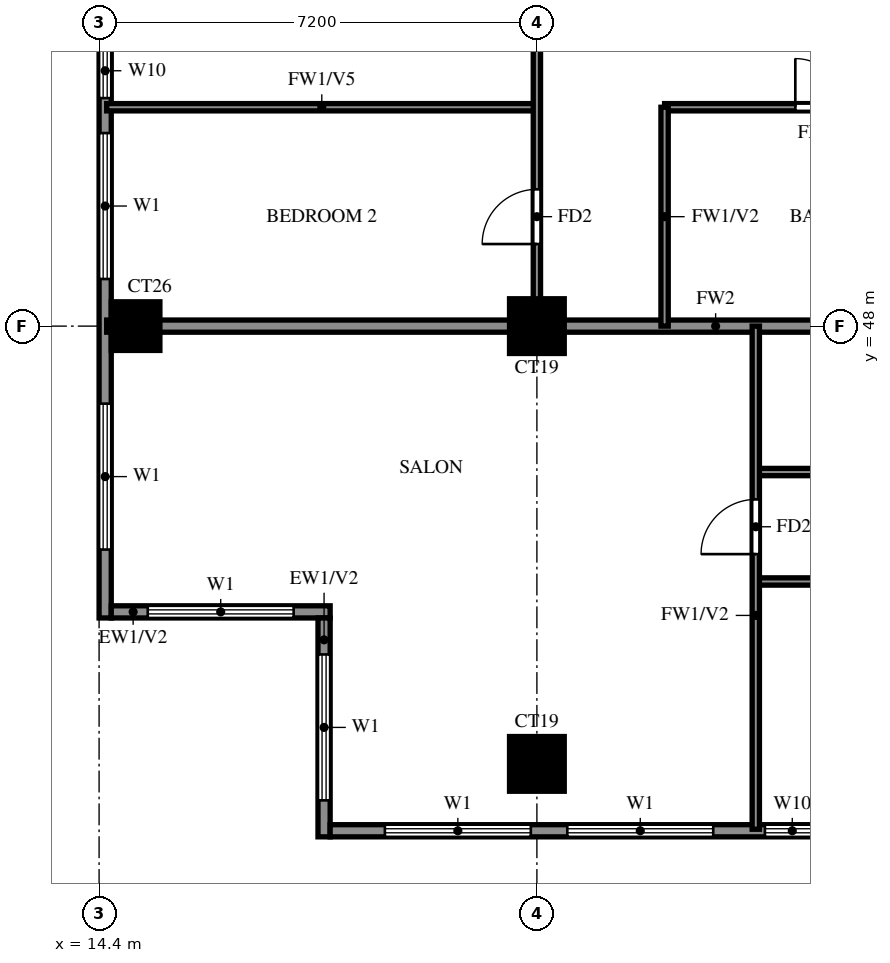
"""IFC4 building model, lengths in metres.
Left out: names, types, materials, properties, quantities, classifications, styles, units other than length and angle.
Written with IfcOpenShell. Run it as: python <this file> out.ifc"""

import sys

from ifc_helpers import new_model, si_unit, direction, frame, frame_2d, origin, origin_2d, place, context, subcontext, project, spatial, rectangle, extrude, source, transform, mapped, element, fill, save


model = new_model("IFC4")
c1 = context("Model", 3, precision=1e-05, world=origin(), true_north=direction((0.0, 1.0)))
c2 = subcontext(c1, "Body", "Model", "MODEL_VIEW")
j1 = project(units=[si_unit("LENGTHUNIT", "METRE"), si_unit("PLANEANGLEUNIT", "RADIAN")], contexts=[c1])
p1 = place(None, origin())
s1 = spatial("IfcSite", under=j1, at=p1, CompositionType="ELEMENT")
p2 = place(p1, origin())
s2 = spatial("IfcBuilding", under=s1, at=p2, CompositionType="ELEMENT")
p3 = place(p2, frame((0.0, 0.0, 181.5)))
s3 = spatial("IfcBuildingStorey", under=s2, at=p3, CompositionType="ELEMENT", Elevation=181.5)
m1 = source(origin(), c2, "Body", "SweptSolid", [
    extrude(rectangle(XDim=0.9, YDim=0.9, at=origin_2d()), origin(), (0.0, 0.0, 1.0), 3.2),
])
p4 = place(p3, frame((21.6, 40.8, 0.0), z_axis=(0.0, 0.0, 1.0), x_axis=(1.0, 0.0, 0.0)))
e1 = element("IfcColumn", 1, at=p4, inside=s3, PredefinedType="COLUMN", context=c2, shape_type="MappedRepresentation", body=[
    mapped(m1, transform((0.0, 0.0, 0.0))),
])
m2 = source(origin(), c2, "Body", "SweptSolid", [
    extrude(rectangle(XDim=0.8, YDim=0.8, at=origin_2d()), origin(), (0.0, 0.0, 1.0), 3.2),
])
p5 = place(p3, frame((15.0, 48.0, 0.0), z_axis=(0.0, 0.0, 1.0), x_axis=(1.0, 0.0, 0.0)))
e2 = element("IfcColumn", 2, at=p5, inside=s3, PredefinedType="COLUMN", context=c2, shape_type="MappedRepresentation", body=[
    mapped(m2, transform((0.0, 0.0, 0.0))),
])
p6 = place(p3, frame((21.6, 48.0, 0.0), z_axis=(0.0, 0.0, 1.0), x_axis=(1.0, 0.0, 0.0)))
e3 = element("IfcColumn", 3, at=p6, inside=s3, PredefinedType="COLUMN", context=c2, shape_type="MappedRepresentation", body=[
    mapped(m1, transform((0.0, 0.0, 0.0))),
])
p7 = place(p3, frame((14.5, 76.6, 0.0), z_axis=(0.0, 0.0, 1.0), x_axis=(0.0, -1.0, 0.0)))
e4 = element("IfcWall", 4, at=p7, inside=s3, PredefinedType="SOLIDWALL", context=c2, shape_type="SweptSolid", body=[
    extrude(rectangle(XDim=33.4, YDim=0.2, at=frame_2d((16.7, 0.0))), origin(), (0.0, 0.0, 1.0), 3.2),
])
p8 = place(p7, frame((18.7, 0.0, 0.0)))
e5 = element("IfcOpeningElement", 5, at=p8, cuts=e4, PredefinedType="OPENING", context=c2, shape_type="SweptSolid", body=[
    extrude(rectangle(XDim=1.8, YDim=2.4, at=frame_2d((0.9, 1.2))), frame((0.0, 0.11, 0.0), z_axis=(0.0, -1.0, 0.0), x_axis=(1.0, 0.0, 0.0)), (0.0, 0.0, 1.0), 0.22),
])
p9 = place(p7, frame((29.875, 0.0, 0.6)))
e6 = element("IfcOpeningElement", 6, at=p9, cuts=e4, PredefinedType="OPENING", context=c2, shape_type="SweptSolid", body=[
    extrude(rectangle(XDim=2.4, YDim=2.4, at=frame_2d((1.2, 1.2))), frame((0.0, 0.11, 0.0), z_axis=(0.0, -1.0, 0.0), x_axis=(1.0, 0.0, 0.0)), (0.0, 0.0, 1.0), 0.22),
])
p10 = place(p7, frame((25.425, 0.0, 0.6)))
e7 = element("IfcOpeningElement", 7, at=p10, cuts=e4, PredefinedType="OPENING", context=c2, shape_type="SweptSolid", body=[
    extrude(rectangle(XDim=2.4, YDim=2.4, at=frame_2d((1.2, 1.2))), frame((0.0, 0.11, 0.0), z_axis=(0.0, -1.0, 0.0), x_axis=(1.0, 0.0, 0.0)), (0.0, 0.0, 1.0), 0.22),
])
p11 = place(p7, frame((21.875, 0.0, 0.6)))
e8 = element("IfcOpeningElement", 8, at=p11, cuts=e4, PredefinedType="OPENING", context=c2, shape_type="SweptSolid", body=[
    extrude(rectangle(XDim=1.2, YDim=2.4, at=frame_2d((0.6, 1.2))), frame((0.0, 0.11, 0.0), z_axis=(0.0, -1.0, 0.0), x_axis=(1.0, 0.0, 0.0)), (0.0, 0.0, 1.0), 0.22),
])
p12 = place(p7, frame((23.95, 0.0, 0.6)))
e9 = element("IfcOpeningElement", 9, at=p12, cuts=e4, PredefinedType="OPENING", context=c2, shape_type="SweptSolid", body=[
    extrude(rectangle(XDim=0.9, YDim=2.4, at=frame_2d((0.45, 1.2))), frame((0.0, 0.11, 0.0), z_axis=(0.0, -1.0, 0.0), x_axis=(1.0, 0.0, 0.0)), (0.0, 0.0, 1.0), 0.22),
])
p13 = place(p7, frame((14.675, 0.0, 0.6)))
e10 = element("IfcOpeningElement", 10, at=p13, cuts=e4, PredefinedType="OPENING", context=c2, shape_type="SweptSolid", body=[
    extrude(rectangle(XDim=1.8, YDim=2.4, at=frame_2d((0.9, 1.2))), frame((0.0, 0.11, 0.0), z_axis=(0.0, -1.0, 0.0), x_axis=(1.0, 0.0, 0.0)), (0.0, 0.0, 1.0), 0.22),
])
p14 = place(p7, frame((7.95, 0.0, 0.6)))
e11 = element("IfcOpeningElement", 11, at=p14, cuts=e4, PredefinedType="OPENING", context=c2, shape_type="SweptSolid", body=[
    extrude(rectangle(XDim=2.4, YDim=2.4, at=frame_2d((1.2, 1.2))), frame((0.0, 0.11, 0.0), z_axis=(0.0, -1.0, 0.0), x_axis=(1.0, 0.0, 0.0)), (0.0, 0.0, 1.0), 0.22),
])
p15 = place(p7, frame((10.85, 0.0, 0.6)))
e12 = element("IfcOpeningElement", 12, at=p15, cuts=e4, PredefinedType="OPENING", context=c2, shape_type="SweptSolid", body=[
    extrude(rectangle(XDim=2.4, YDim=2.4, at=frame_2d((1.2, 1.2))), frame((0.0, 0.11, 0.0), z_axis=(0.0, -1.0, 0.0), x_axis=(1.0, 0.0, 0.0)), (0.0, 0.0, 1.0), 0.22),
])
p16 = place(p7, frame((4.575, 0.0, 1.5)))
e13 = element("IfcOpeningElement", 13, at=p16, cuts=e4, PredefinedType="OPENING", context=c2, shape_type="SweptSolid", body=[
    extrude(rectangle(XDim=0.9, YDim=0.9, at=frame_2d((0.45, 0.45))), frame((0.0, 0.11, 0.0), z_axis=(0.0, -1.0, 0.0), x_axis=(1.0, 0.0, 0.0)), (0.0, 0.0, 1.0), 0.22),
])
p17 = place(p7, frame((0.6, 0.0, 0.6)))
e14 = element("IfcOpeningElement", 14, at=p17, cuts=e4, PredefinedType="OPENING", context=c2, shape_type="SweptSolid", body=[
    extrude(rectangle(XDim=2.4, YDim=2.4, at=frame_2d((1.2, 1.2))), frame((0.0, 0.11, 0.0), z_axis=(0.0, -1.0, 0.0), x_axis=(1.0, 0.0, 0.0)), (0.0, 0.0, 1.0), 0.22),
])
p18 = place(p3, frame((14.6, 43.3, 0.0), z_axis=(0.0, 0.0, 1.0), x_axis=(1.0, 0.0, 0.0)))
e15 = element("IfcWall", 15, at=p18, inside=s3, PredefinedType="SOLIDWALL", context=c2, shape_type="SweptSolid", body=[
    extrude(rectangle(XDim=3.6, YDim=0.2, at=frame_2d((1.8, 0.0))), origin(), (0.0, 0.0, 1.0), 3.2),
])
p19 = place(p18, frame((0.6, 0.0, 0.6)))
e16 = element("IfcOpeningElement", 16, at=p19, cuts=e15, PredefinedType="OPENING", context=c2, shape_type="SweptSolid", body=[
    extrude(rectangle(XDim=2.4, YDim=2.4, at=frame_2d((1.2, 1.2))), frame((0.0, 0.11, 0.0), z_axis=(0.0, -1.0, 0.0), x_axis=(1.0, 0.0, 0.0)), (0.0, 0.0, 1.0), 0.22),
])
p20 = place(p3, frame((18.1, 43.2, 0.0), z_axis=(0.0, 0.0, 1.0), x_axis=(0.0, -1.0, 0.0)))
e17 = element("IfcWall", 17, at=p20, inside=s3, PredefinedType="SOLIDWALL", context=c2, shape_type="SweptSolid", body=[
    extrude(rectangle(XDim=3.6, YDim=0.2, at=frame_2d((1.8, 0.0))), origin(), (0.0, 0.0, 1.0), 3.2),
])
p21 = place(p20, frame((0.6, 0.0, 0.6)))
e18 = element("IfcOpeningElement", 18, at=p21, cuts=e17, PredefinedType="OPENING", context=c2, shape_type="SweptSolid", body=[
    extrude(rectangle(XDim=2.4, YDim=2.4, at=frame_2d((1.2, 1.2))), frame((0.0, 0.11, 0.0), z_axis=(0.0, -1.0, 0.0), x_axis=(1.0, 0.0, 0.0)), (0.0, 0.0, 1.0), 0.22),
])
p22 = place(p3, frame((18.2, 39.7, 0.0), z_axis=(0.0, 0.0, 1.0), x_axis=(1.0, 0.0, 0.0)))
e19 = element("IfcWall", 19, at=p22, inside=s3, PredefinedType="SOLIDWALL", context=c2, shape_type="SweptSolid", body=[
    extrude(rectangle(XDim=23.8, YDim=0.2, at=frame_2d((11.9, 0.0))), origin(), (0.0, 0.0, 1.0), 3.2),
])
p23 = place(p22, frame((11.5, 0.0, 0.0)))
e20 = element("IfcOpeningElement", 20, at=p23, cuts=e19, PredefinedType="OPENING", context=c2, shape_type="SweptSolid", body=[
    extrude(rectangle(XDim=1.8, YDim=2.4, at=frame_2d((0.9, 1.2))), frame((0.0, 0.11, 0.0), z_axis=(0.0, -1.0, 0.0), x_axis=(1.0, 0.0, 0.0)), (0.0, 0.0, 1.0), 0.22),
])
p24 = place(p22, frame((0.9, 0.0, 0.6)))
e21 = element("IfcOpeningElement", 21, at=p24, cuts=e19, PredefinedType="OPENING", context=c2, shape_type="SweptSolid", body=[
    extrude(rectangle(XDim=2.4, YDim=2.4, at=frame_2d((1.2, 1.2))), frame((0.0, 0.11, 0.0), z_axis=(0.0, -1.0, 0.0), x_axis=(1.0, 0.0, 0.0)), (0.0, 0.0, 1.0), 0.22),
])
p25 = place(p22, frame((3.9, 0.0, 0.6)))
e22 = element("IfcOpeningElement", 22, at=p25, cuts=e19, PredefinedType="OPENING", context=c2, shape_type="SweptSolid", body=[
    extrude(rectangle(XDim=2.4, YDim=2.4, at=frame_2d((1.2, 1.2))), frame((0.0, 0.11, 0.0), z_axis=(0.0, -1.0, 0.0), x_axis=(1.0, 0.0, 0.0)), (0.0, 0.0, 1.0), 0.22),
])
p26 = place(p22, frame((7.15, 0.0, 0.6)))
e23 = element("IfcOpeningElement", 23, at=p26, cuts=e19, PredefinedType="OPENING", context=c2, shape_type="SweptSolid", body=[
    extrude(rectangle(XDim=0.9, YDim=2.4, at=frame_2d((0.45, 1.2))), frame((0.0, 0.11, 0.0), z_axis=(0.0, -1.0, 0.0), x_axis=(1.0, 0.0, 0.0)), (0.0, 0.0, 1.0), 0.22),
])
p27 = place(p22, frame((9.1, 0.0, 0.6)))
e24 = element("IfcOpeningElement", 24, at=p27, cuts=e19, PredefinedType="OPENING", context=c2, shape_type="SweptSolid", body=[
    extrude(rectangle(XDim=1.2, YDim=2.4, at=frame_2d((0.6, 1.2))), frame((0.0, 0.11, 0.0), z_axis=(0.0, -1.0, 0.0), x_axis=(1.0, 0.0, 0.0)), (0.0, 0.0, 1.0), 0.22),
])
p28 = place(p22, frame((13.75, 0.0, 0.6)))
e25 = element("IfcOpeningElement", 25, at=p28, cuts=e19, PredefinedType="OPENING", context=c2, shape_type="SweptSolid", body=[
    extrude(rectangle(XDim=0.9, YDim=2.4, at=frame_2d((0.45, 1.2))), frame((0.0, 0.11, 0.0), z_axis=(0.0, -1.0, 0.0), x_axis=(1.0, 0.0, 0.0)), (0.0, 0.0, 1.0), 0.22),
])
p29 = place(p3, frame((14.525, 48.0, 0.0), z_axis=(0.0, 0.0, 1.0), x_axis=(1.0, 0.0, 0.0)))
e26 = element("IfcWall", 26, at=p29, inside=s3, PredefinedType="SOLIDWALL", context=c2, shape_type="SweptSolid", body=[
    extrude(rectangle(XDim=19.075, YDim=0.2, at=frame_2d((9.538, 0.0))), origin(), (0.0, 0.0, 1.0), 3.2),
])
p30 = place(p3, frame((25.2, 43.8, 0.0), z_axis=(0.0, 0.0, 1.0), x_axis=(1.0, 0.0, 0.0)))
e27 = element("IfcWall", 27, at=p30, inside=s3, PredefinedType="PARTITIONING", context=c2, shape_type="SweptSolid", body=[
    extrude(rectangle(XDim=8.4, YDim=0.12, at=frame_2d((4.2, 0.0))), origin(), (0.0, 0.0, 1.0), 3.2),
])
p31 = place(p30, frame((1.35, 0.0, 0.0)))
e28 = element("IfcOpeningElement", 28, at=p31, cuts=e27, PredefinedType="OPENING", context=c2, shape_type="SweptSolid", body=[
    extrude(rectangle(XDim=0.9, YDim=2.1, at=frame_2d((0.45, 1.05))), frame((0.0, 0.07, 0.0), z_axis=(0.0, -1.0, 0.0), x_axis=(1.0, 0.0, 0.0)), (0.0, 0.0, 1.0), 0.14),
])
p32 = place(p30, frame((5.55, 0.0, 0.0)))
e29 = element("IfcOpeningElement", 29, at=p32, cuts=e27, PredefinedType="OPENING", context=c2, shape_type="SweptSolid", body=[
    extrude(rectangle(XDim=0.9, YDim=2.1, at=frame_2d((0.45, 1.05))), frame((0.0, 0.07, 0.0), z_axis=(0.0, -1.0, 0.0), x_axis=(1.0, 0.0, 0.0)), (0.0, 0.0, 1.0), 0.14),
])
p33 = place(p3, frame((25.2, 45.6, 0.0), z_axis=(0.0, 0.0, 1.0), x_axis=(1.0, 0.0, 0.0)))
e30 = element("IfcWall", 30, at=p33, inside=s3, PredefinedType="PARTITIONING", context=c2, shape_type="SweptSolid", body=[
    extrude(rectangle(XDim=6.0, YDim=0.12, at=frame_2d((3.0, 0.0))), origin(), (0.0, 0.0, 1.0), 3.2),
])
p34 = place(p33, frame((1.45, 0.0, 0.0)))
e31 = element("IfcOpeningElement", 31, at=p34, cuts=e30, PredefinedType="OPENING", context=c2, shape_type="SweptSolid", body=[
    extrude(rectangle(XDim=0.9, YDim=2.1, at=frame_2d((0.45, 1.05))), frame((0.0, 0.07, 0.0), z_axis=(0.0, -1.0, 0.0), x_axis=(1.0, 0.0, 0.0)), (0.0, 0.0, 1.0), 0.14),
])
p35 = place(p3, frame((14.525, 51.6, 0.0), z_axis=(0.0, 0.0, 1.0), x_axis=(1.0, 0.0, 0.0)))
e32 = element("IfcWall", 32, at=p35, inside=s3, PredefinedType="PARTITIONING", context=c2, shape_type="SweptSolid", body=[
    extrude(rectangle(XDim=7.075, YDim=0.12, at=frame_2d((3.538, 0.0))), origin(), (0.0, 0.0, 1.0), 2.3),
])
p36 = place(p3, frame((23.7, 51.6, 0.0), z_axis=(0.0, 0.0, 1.0), x_axis=(1.0, 0.0, 0.0)))
e33 = element("IfcWall", 33, at=p36, inside=s3, PredefinedType="PARTITIONING", context=c2, shape_type="SweptSolid", body=[
    extrude(rectangle(XDim=9.9, YDim=0.12, at=frame_2d((4.95, 0.0))), origin(), (0.0, 0.0, 1.0), 3.2),
])
p37 = place(p36, frame((2.15, 0.0, 0.0)))
e34 = element("IfcOpeningElement", 34, at=p37, cuts=e33, PredefinedType="OPENING", context=c2, shape_type="SweptSolid", body=[
    extrude(rectangle(XDim=0.8, YDim=2.1, at=frame_2d((0.4, 1.05))), frame((0.0, 0.07, 0.0), z_axis=(0.0, -1.0, 0.0), x_axis=(1.0, 0.0, 0.0)), (0.0, 0.0, 1.0), 0.14),
])
p38 = place(p36, frame((7.05, 0.0, 0.0)))
e35 = element("IfcOpeningElement", 35, at=p38, cuts=e33, PredefinedType="OPENING", context=c2, shape_type="SweptSolid", body=[
    extrude(rectangle(XDim=0.9, YDim=2.1, at=frame_2d((0.45, 1.05))), frame((0.0, 0.07, 0.0), z_axis=(0.0, -1.0, 0.0), x_axis=(1.0, 0.0, 0.0)), (0.0, 0.0, 1.0), 0.14),
])
p39 = place(p3, frame((21.6, 48.0, 0.0), z_axis=(0.0, 0.0, 1.0), x_axis=(0.0, 1.0, 0.0)))
e36 = element("IfcWall", 36, at=p39, inside=s3, PredefinedType="PARTITIONING", context=c2, shape_type="SweptSolid", body=[
    extrude(rectangle(XDim=21.6, YDim=0.12, at=frame_2d((10.8, 0.0))), origin(), (0.0, 0.0, 1.0), 3.2),
])
p40 = place(p39, frame((1.35, 0.0, 0.0)))
e37 = element("IfcOpeningElement", 37, at=p40, cuts=e36, PredefinedType="OPENING", context=c2, shape_type="SweptSolid", body=[
    extrude(rectangle(XDim=0.9, YDim=2.1, at=frame_2d((0.45, 1.05))), frame((0.0, 0.07, 0.0), z_axis=(0.0, -1.0, 0.0), x_axis=(1.0, 0.0, 0.0)), (0.0, 0.0, 1.0), 0.14),
])
p41 = place(p39, frame((7.95, 0.0, 0.0)))
e38 = element("IfcOpeningElement", 38, at=p41, cuts=e36, PredefinedType="OPENING", context=c2, shape_type="SweptSolid", body=[
    extrude(rectangle(XDim=1.5, YDim=2.1, at=frame_2d((0.75, 1.05))), frame((0.0, 0.07, 0.0), z_axis=(0.0, -1.0, 0.0), x_axis=(1.0, 0.0, 0.0)), (0.0, 0.0, 1.0), 0.14),
])
p42 = place(p39, frame((12.15, 0.0, 0.0)))
e39 = element("IfcOpeningElement", 39, at=p42, cuts=e36, PredefinedType="OPENING", context=c2, shape_type="SweptSolid", body=[
    extrude(rectangle(XDim=0.9, YDim=2.1, at=frame_2d((0.45, 1.05))), frame((0.0, 0.07, 0.0), z_axis=(0.0, -1.0, 0.0), x_axis=(1.0, 0.0, 0.0)), (0.0, 0.0, 1.0), 0.14),
])
p43 = place(p39, frame((17.55, 0.0, 0.0)))
e40 = element("IfcOpeningElement", 40, at=p43, cuts=e36, PredefinedType="OPENING", context=c2, shape_type="SweptSolid", body=[
    extrude(rectangle(XDim=0.9, YDim=2.1, at=frame_2d((0.45, 1.05))), frame((0.0, 0.07, 0.0), z_axis=(0.0, -1.0, 0.0), x_axis=(1.0, 0.0, 0.0)), (0.0, 0.0, 1.0), 0.14),
])
p44 = place(p3, frame((23.7, 48.0, 0.0), z_axis=(0.0, 0.0, 1.0), x_axis=(0.0, 1.0, 0.0)))
e41 = element("IfcWall", 41, at=p44, inside=s3, PredefinedType="PARTITIONING", context=c2, shape_type="SweptSolid", body=[
    extrude(rectangle(XDim=3.6, YDim=0.12, at=frame_2d((1.8, 0.0))), origin(), (0.0, 0.0, 1.0), 3.2),
])
p45 = place(p3, frame((25.2, 39.725, 0.0), z_axis=(0.0, 0.0, 1.0), x_axis=(0.0, 1.0, 0.0)))
e42 = element("IfcWall", 42, at=p45, inside=s3, PredefinedType="PARTITIONING", context=c2, shape_type="SweptSolid", body=[
    extrude(rectangle(XDim=8.275, YDim=0.12, at=frame_2d((4.137, 0.0))), origin(), (0.0, 0.0, 1.0), 3.2),
])
p46 = place(p45, frame((4.525, 0.0, 0.0)))
e43 = element("IfcOpeningElement", 43, at=p46, cuts=e42, PredefinedType="OPENING", context=c2, shape_type="SweptSolid", body=[
    extrude(rectangle(XDim=0.9, YDim=2.1, at=frame_2d((0.45, 1.05))), frame((0.0, 0.07, 0.0), z_axis=(0.0, -1.0, 0.0), x_axis=(1.0, 0.0, 0.0)), (0.0, 0.0, 1.0), 0.14),
])
p47 = place(p9, origin())
e44 = element("IfcWindow", 44, at=p47, inside=s3, PartitioningType="DOUBLE_PANEL_VERTICAL", PredefinedType="WINDOW", context=c2, shape_type="SweptSolid", body=[
    extrude(rectangle(XDim=2.4, YDim=2.4, at=frame_2d((1.2, 1.2))), frame((0.0, 0.03, 0.0), z_axis=(0.0, -1.0, 0.0), x_axis=(1.0, 0.0, 0.0)), (0.0, 0.0, 1.0), 0.06),
])
fill(e6, e44)
p48 = place(p10, origin())
e45 = element("IfcWindow", 45, at=p48, inside=s3, PartitioningType="DOUBLE_PANEL_VERTICAL", PredefinedType="WINDOW", context=c2, shape_type="SweptSolid", body=[
    extrude(rectangle(XDim=2.4, YDim=2.4, at=frame_2d((1.2, 1.2))), frame((0.0, 0.03, 0.0), z_axis=(0.0, -1.0, 0.0), x_axis=(1.0, 0.0, 0.0)), (0.0, 0.0, 1.0), 0.06),
])
fill(e7, e45)
p49 = place(p12, origin())
e46 = element("IfcWindow", 46, at=p49, inside=s3, PartitioningType="SINGLE_PANEL", PredefinedType="WINDOW", context=c2, shape_type="SweptSolid", body=[
    extrude(rectangle(XDim=0.9, YDim=2.4, at=frame_2d((0.45, 1.2))), frame((0.0, 0.03, 0.0), z_axis=(0.0, -1.0, 0.0), x_axis=(1.0, 0.0, 0.0)), (0.0, 0.0, 1.0), 0.06),
])
fill(e9, e46)
p50 = place(p19, origin())
e47 = element("IfcWindow", 47, at=p50, inside=s3, PartitioningType="DOUBLE_PANEL_VERTICAL", PredefinedType="WINDOW", context=c2, shape_type="SweptSolid", body=[
    extrude(rectangle(XDim=2.4, YDim=2.4, at=frame_2d((1.2, 1.2))), frame((0.0, 0.03, 0.0), z_axis=(0.0, -1.0, 0.0), x_axis=(1.0, 0.0, 0.0)), (0.0, 0.0, 1.0), 0.06),
])
fill(e16, e47)
p51 = place(p21, origin())
e48 = element("IfcWindow", 48, at=p51, inside=s3, PartitioningType="DOUBLE_PANEL_VERTICAL", PredefinedType="WINDOW", context=c2, shape_type="SweptSolid", body=[
    extrude(rectangle(XDim=2.4, YDim=2.4, at=frame_2d((1.2, 1.2))), frame((0.0, 0.03, 0.0), z_axis=(0.0, -1.0, 0.0), x_axis=(1.0, 0.0, 0.0)), (0.0, 0.0, 1.0), 0.06),
])
fill(e18, e48)
p52 = place(p24, origin())
e49 = element("IfcWindow", 49, at=p52, inside=s3, PartitioningType="DOUBLE_PANEL_VERTICAL", PredefinedType="WINDOW", context=c2, shape_type="SweptSolid", body=[
    extrude(rectangle(XDim=2.4, YDim=2.4, at=frame_2d((1.2, 1.2))), frame((0.0, 0.03, 0.0), z_axis=(0.0, -1.0, 0.0), x_axis=(1.0, 0.0, 0.0)), (0.0, 0.0, 1.0), 0.06),
])
fill(e21, e49)
p53 = place(p25, origin())
e50 = element("IfcWindow", 50, at=p53, inside=s3, PartitioningType="DOUBLE_PANEL_VERTICAL", PredefinedType="WINDOW", context=c2, shape_type="SweptSolid", body=[
    extrude(rectangle(XDim=2.4, YDim=2.4, at=frame_2d((1.2, 1.2))), frame((0.0, 0.03, 0.0), z_axis=(0.0, -1.0, 0.0), x_axis=(1.0, 0.0, 0.0)), (0.0, 0.0, 1.0), 0.06),
])
fill(e22, e50)
p54 = place(p26, origin())
e51 = element("IfcWindow", 51, at=p54, inside=s3, PartitioningType="SINGLE_PANEL", PredefinedType="WINDOW", context=c2, shape_type="SweptSolid", body=[
    extrude(rectangle(XDim=0.9, YDim=2.4, at=frame_2d((0.45, 1.2))), frame((0.0, 0.03, 0.0), z_axis=(0.0, -1.0, 0.0), x_axis=(1.0, 0.0, 0.0)), (0.0, 0.0, 1.0), 0.06),
])
fill(e23, e51)
p55 = place(p46, origin())
e52 = element("IfcDoor", 52, at=p55, inside=s3, OperationType="SINGLE_SWING_LEFT", PredefinedType="DOOR", context=c2, shape_type="SweptSolid", body=[
    extrude(rectangle(XDim=0.9, YDim=2.1, at=frame_2d((0.45, 1.05))), frame((0.0, 0.025, 0.0), z_axis=(0.0, -1.0, 0.0), x_axis=(1.0, 0.0, 0.0)), (0.0, 0.0, 1.0), 0.05),
])
fill(e43, e52)
p56 = place(p40, origin())
e53 = element("IfcDoor", 53, at=p56, inside=s3, OperationType="SINGLE_SWING_LEFT", PredefinedType="DOOR", context=c2, shape_type="SweptSolid", body=[
    extrude(rectangle(XDim=0.9, YDim=2.1, at=frame_2d((0.45, 1.05))), frame((0.0, 0.025, 0.0), z_axis=(0.0, -1.0, 0.0), x_axis=(1.0, 0.0, 0.0)), (0.0, 0.0, 1.0), 0.05),
])
fill(e37, e53)
p57 = place(p37, origin())
e54 = element("IfcDoor", 54, at=p57, inside=s3, OperationType="SINGLE_SWING_LEFT", PredefinedType="DOOR", context=c2, shape_type="SweptSolid", body=[
    extrude(rectangle(XDim=0.8, YDim=2.1, at=frame_2d((0.4, 1.05))), frame((0.0, 0.025, 0.0), z_axis=(0.0, -1.0, 0.0), x_axis=(1.0, 0.0, 0.0)), (0.0, 0.0, 1.0), 0.05),
])
fill(e34, e54)
save(model, sys.argv[1])
